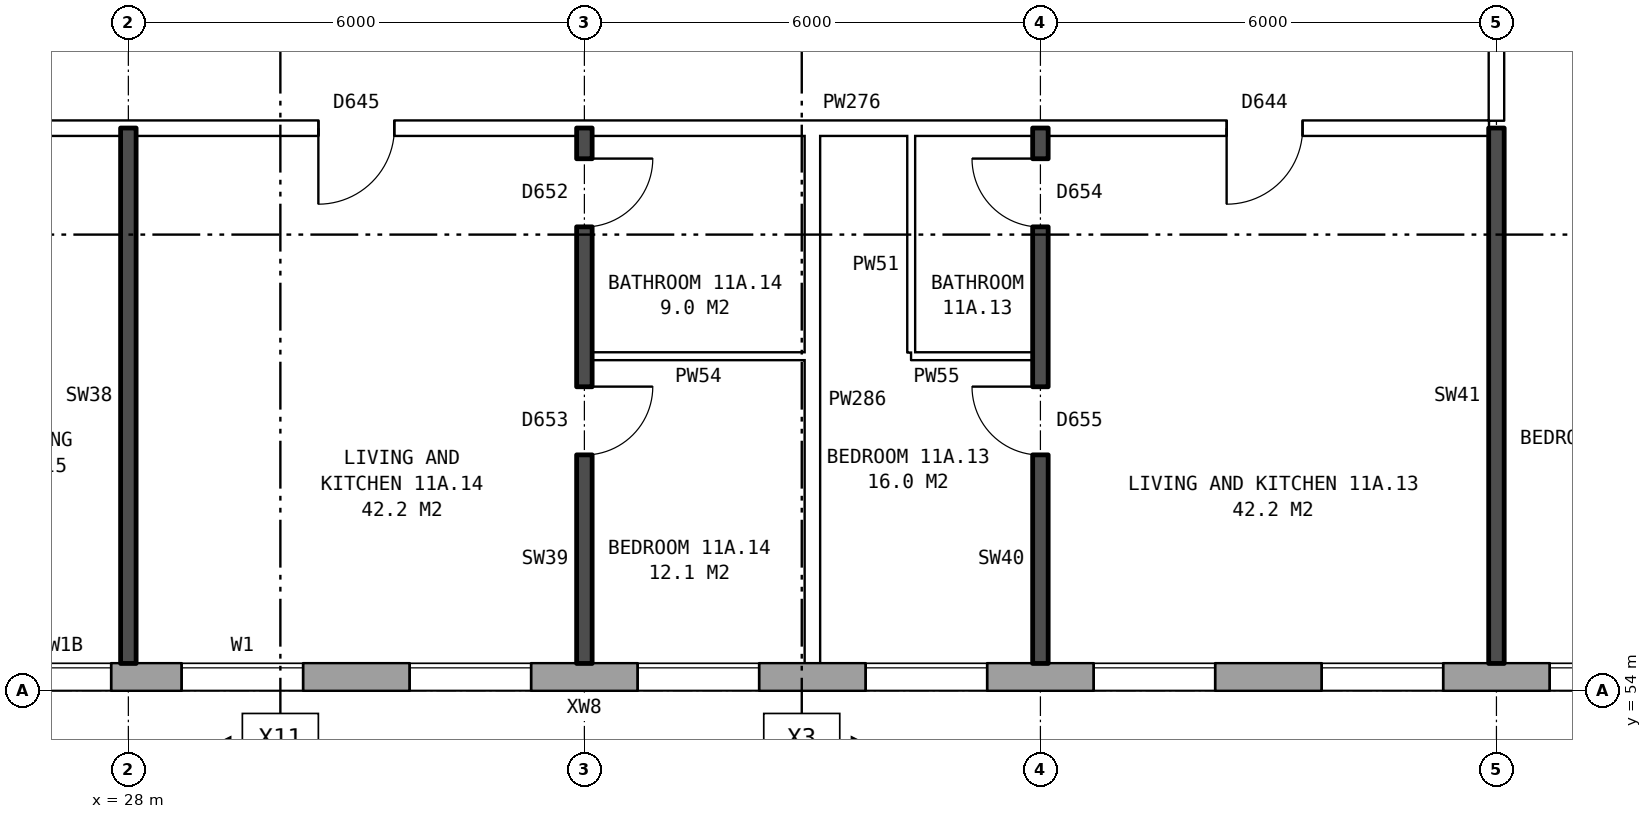
"""IFC4 building model, lengths in metres.
Left out: names, types, materials, properties, quantities, classifications, styles, units other than length and angle.
Written with IfcOpenShell. Run it as: python <this file> out.ifc"""

import sys

from ifc_helpers import new_model, si_unit, direction, frame, frame_2d, origin, place, context, subcontext, project, spatial, rectangle, extrude, element, fill, save


model = new_model("IFC4")
c1 = context("Model", 3, precision=1e-05, world=origin(), true_north=direction((0.0, 1.0)))
c2 = subcontext(c1, "Body", "Model", "MODEL_VIEW")
j1 = project(units=[si_unit("LENGTHUNIT", "METRE"), si_unit("PLANEANGLEUNIT", "RADIAN")], contexts=[c1])
p1 = place(None, origin())
s1 = spatial("IfcSite", under=j1, at=p1, CompositionType="ELEMENT")
p2 = place(p1, origin())
s2 = spatial("IfcBuilding", under=s1, at=p2, CompositionType="ELEMENT")
p3 = place(p2, frame((0.0, 0.0, 44.3)))
s3 = spatial("IfcBuildingStorey", under=s2, at=p3, CompositionType="ELEMENT", Elevation=44.3)
p4 = place(p3, frame((24.575, 54.18, 0.0), z_axis=(0.0, 0.0, 1.0), x_axis=(1.0, 0.0, 0.0)))
e1 = element("IfcWall", 1, at=p4, inside=s3, PredefinedType="STANDARD", context=c2, shape_type="SweptSolid", body=[
    extrude(rectangle(XDim=48.351, YDim=0.36, at=frame_2d((24.175, 0.0))), origin(), (0.0, 0.0, 1.0), 2.85),
])
p5 = place(p4, frame((0.65, 0.0, 0.8)))
e2 = element("IfcOpeningElement", 2, at=p5, cuts=e1, PredefinedType="OPENING", context=c2, shape_type="SweptSolid", body=[
    extrude(rectangle(XDim=1.0, YDim=0.9, at=frame_2d((0.5, 0.45))), frame((0.0, 0.19, 0.0), z_axis=(0.0, -1.0, 0.0), x_axis=(1.0, 0.0, 0.0)), (0.0, 0.0, 1.0), 0.38),
])
p6 = place(p4, frame((4.125, 0.0, 0.8)))
e3 = element("IfcOpeningElement", 3, at=p6, cuts=e1, PredefinedType="OPENING", context=c2, shape_type="SweptSolid", body=[
    extrude(rectangle(XDim=1.6, YDim=1.8, at=frame_2d((0.8, 0.9))), frame((0.0, 0.19, 0.0), z_axis=(0.0, -1.0, 0.0), x_axis=(1.0, 0.0, 0.0)), (0.0, 0.0, 1.0), 0.38),
])
p7 = place(p4, frame((7.125, 0.0, 0.8)))
e4 = element("IfcOpeningElement", 4, at=p7, cuts=e1, PredefinedType="OPENING", context=c2, shape_type="SweptSolid", body=[
    extrude(rectangle(XDim=1.6, YDim=1.8, at=frame_2d((0.8, 0.9))), frame((0.0, 0.19, 0.0), z_axis=(0.0, -1.0, 0.0), x_axis=(1.0, 0.0, 0.0)), (0.0, 0.0, 1.0), 0.38),
])
p8 = place(p4, frame((10.125, 0.0, 0.8)))
e5 = element("IfcOpeningElement", 5, at=p8, cuts=e1, PredefinedType="OPENING", context=c2, shape_type="SweptSolid", body=[
    extrude(rectangle(XDim=1.6, YDim=1.8, at=frame_2d((0.8, 0.9))), frame((0.0, 0.19, 0.0), z_axis=(0.0, -1.0, 0.0), x_axis=(1.0, 0.0, 0.0)), (0.0, 0.0, 1.0), 0.38),
])
p9 = place(p4, frame((13.125, 0.0, 0.8)))
e6 = element("IfcOpeningElement", 6, at=p9, cuts=e1, PredefinedType="OPENING", context=c2, shape_type="SweptSolid", body=[
    extrude(rectangle(XDim=1.6, YDim=1.8, at=frame_2d((0.8, 0.9))), frame((0.0, 0.19, 0.0), z_axis=(0.0, -1.0, 0.0), x_axis=(1.0, 0.0, 0.0)), (0.0, 0.0, 1.0), 0.38),
])
p10 = place(p4, frame((16.125, 0.0, 0.8)))
e7 = element("IfcOpeningElement", 7, at=p10, cuts=e1, PredefinedType="OPENING", context=c2, shape_type="SweptSolid", body=[
    extrude(rectangle(XDim=1.6, YDim=1.8, at=frame_2d((0.8, 0.9))), frame((0.0, 0.19, 0.0), z_axis=(0.0, -1.0, 0.0), x_axis=(1.0, 0.0, 0.0)), (0.0, 0.0, 1.0), 0.38),
])
p11 = place(p4, frame((19.125, 0.0, 0.8)))
e8 = element("IfcOpeningElement", 8, at=p11, cuts=e1, PredefinedType="OPENING", context=c2, shape_type="SweptSolid", body=[
    extrude(rectangle(XDim=1.6, YDim=1.8, at=frame_2d((0.8, 0.9))), frame((0.0, 0.19, 0.0), z_axis=(0.0, -1.0, 0.0), x_axis=(1.0, 0.0, 0.0)), (0.0, 0.0, 1.0), 0.38),
])
p12 = place(p4, frame((22.125, 0.0, 0.8)))
e9 = element("IfcOpeningElement", 9, at=p12, cuts=e1, PredefinedType="OPENING", context=c2, shape_type="SweptSolid", body=[
    extrude(rectangle(XDim=1.6, YDim=1.8, at=frame_2d((0.8, 0.9))), frame((0.0, 0.19, 0.0), z_axis=(0.0, -1.0, 0.0), x_axis=(1.0, 0.0, 0.0)), (0.0, 0.0, 1.0), 0.38),
])
p13 = place(p4, frame((25.125, 0.0, 0.8)))
e10 = element("IfcOpeningElement", 10, at=p13, cuts=e1, PredefinedType="OPENING", context=c2, shape_type="SweptSolid", body=[
    extrude(rectangle(XDim=1.6, YDim=1.8, at=frame_2d((0.8, 0.9))), frame((0.0, 0.19, 0.0), z_axis=(0.0, -1.0, 0.0), x_axis=(1.0, 0.0, 0.0)), (0.0, 0.0, 1.0), 0.38),
])
p14 = place(p4, frame((28.125, 0.0, 0.8)))
e11 = element("IfcOpeningElement", 11, at=p14, cuts=e1, PredefinedType="OPENING", context=c2, shape_type="SweptSolid", body=[
    extrude(rectangle(XDim=1.6, YDim=1.8, at=frame_2d((0.8, 0.9))), frame((0.0, 0.19, 0.0), z_axis=(0.0, -1.0, 0.0), x_axis=(1.0, 0.0, 0.0)), (0.0, 0.0, 1.0), 0.38),
])
p15 = place(p4, frame((31.125, 0.0, 0.8)))
e12 = element("IfcOpeningElement", 12, at=p15, cuts=e1, PredefinedType="OPENING", context=c2, shape_type="SweptSolid", body=[
    extrude(rectangle(XDim=1.6, YDim=1.8, at=frame_2d((0.8, 0.9))), frame((0.0, 0.19, 0.0), z_axis=(0.0, -1.0, 0.0), x_axis=(1.0, 0.0, 0.0)), (0.0, 0.0, 1.0), 0.38),
])
p16 = place(p4, frame((34.125, 0.0, 0.8)))
e13 = element("IfcOpeningElement", 13, at=p16, cuts=e1, PredefinedType="OPENING", context=c2, shape_type="SweptSolid", body=[
    extrude(rectangle(XDim=1.6, YDim=1.8, at=frame_2d((0.8, 0.9))), frame((0.0, 0.19, 0.0), z_axis=(0.0, -1.0, 0.0), x_axis=(1.0, 0.0, 0.0)), (0.0, 0.0, 1.0), 0.38),
])
p17 = place(p4, frame((37.125, 0.0, 0.8)))
e14 = element("IfcOpeningElement", 14, at=p17, cuts=e1, PredefinedType="OPENING", context=c2, shape_type="SweptSolid", body=[
    extrude(rectangle(XDim=1.6, YDim=1.8, at=frame_2d((0.8, 0.9))), frame((0.0, 0.19, 0.0), z_axis=(0.0, -1.0, 0.0), x_axis=(1.0, 0.0, 0.0)), (0.0, 0.0, 1.0), 0.38),
])
p18 = place(p4, frame((40.125, 0.0, 0.8)))
e15 = element("IfcOpeningElement", 15, at=p18, cuts=e1, PredefinedType="OPENING", context=c2, shape_type="SweptSolid", body=[
    extrude(rectangle(XDim=1.6, YDim=1.8, at=frame_2d((0.8, 0.9))), frame((0.0, 0.19, 0.0), z_axis=(0.0, -1.0, 0.0), x_axis=(1.0, 0.0, 0.0)), (0.0, 0.0, 1.0), 0.38),
])
p19 = place(p4, frame((43.125, 0.0, 0.8)))
e16 = element("IfcOpeningElement", 16, at=p19, cuts=e1, PredefinedType="OPENING", context=c2, shape_type="SweptSolid", body=[
    extrude(rectangle(XDim=1.6, YDim=1.8, at=frame_2d((0.8, 0.9))), frame((0.0, 0.19, 0.0), z_axis=(0.0, -1.0, 0.0), x_axis=(1.0, 0.0, 0.0)), (0.0, 0.0, 1.0), 0.38),
])
p20 = place(p4, frame((45.625, 0.0, 0.8)))
e17 = element("IfcOpeningElement", 17, at=p20, cuts=e1, PredefinedType="OPENING", context=c2, shape_type="SweptSolid", body=[
    extrude(rectangle(XDim=1.0, YDim=1.5, at=frame_2d((0.5, 0.75))), frame((0.0, 0.19, 0.0), z_axis=(0.0, -1.0, 0.0), x_axis=(1.0, 0.0, 0.0)), (0.0, 0.0, 1.0), 0.38),
])
p21 = place(p4, frame((2.0, 0.0, 0.8)))
e18 = element("IfcOpeningElement", 18, at=p21, cuts=e1, PredefinedType="OPENING", context=c2, shape_type="SweptSolid", body=[
    extrude(rectangle(XDim=1.2, YDim=1.8, at=frame_2d((0.6, 0.9))), frame((0.0, 0.19, 0.0), z_axis=(0.0, -1.0, 0.0), x_axis=(1.0, 0.0, 0.0)), (0.0, 0.0, 1.0), 0.38),
])
p22 = place(p4, frame((46.925, 0.0, 0.8)))
e19 = element("IfcOpeningElement", 19, at=p22, cuts=e1, PredefinedType="OPENING", context=c2, shape_type="SweptSolid", body=[
    extrude(rectangle(XDim=0.6, YDim=0.9, at=frame_2d((0.3, 0.45))), frame((0.0, 0.19, 0.0), z_axis=(0.0, -1.0, 0.0), x_axis=(1.0, 0.0, 0.0)), (0.0, 0.0, 1.0), 0.38),
])
p23 = place(p3, frame((34.1, 58.4, 0.0), z_axis=(0.0, 0.0, 1.0), x_axis=(1.0, 0.0, 0.0)))
e20 = element("IfcWall", 20, at=p23, inside=s3, PredefinedType="PARTITIONING", context=c2, shape_type="SweptSolid", body=[
    extrude(rectangle(XDim=2.8, YDim=0.1, at=frame_2d((1.4, 0.0))), origin(), (0.0, 0.0, 1.0), 2.85),
])
p24 = place(p3, frame((38.3, 58.4, 0.0), z_axis=(0.0, 0.0, 1.0), x_axis=(1.0, 0.0, 0.0)))
e21 = element("IfcWall", 21, at=p24, inside=s3, PredefinedType="PARTITIONING", context=c2, shape_type="SweptSolid", body=[
    extrude(rectangle(XDim=1.6, YDim=0.1, at=frame_2d((0.8, 0.0))), origin(), (0.0, 0.0, 1.0), 2.85),
])
p25 = place(p3, frame((21.86, 61.4, 0.0), z_axis=(0.0, 0.0, 1.0), x_axis=(1.0, 0.0, 0.0)))
e22 = element("IfcWall", 22, at=p25, inside=s3, PredefinedType="PARTITIONING", context=c2, shape_type="SweptSolid", body=[
    extrude(rectangle(XDim=24.04, YDim=0.2, at=frame_2d((12.02, 0.0))), origin(), (0.0, 0.0, 1.0), 2.85),
])
p26 = place(p25, frame((20.59, 0.0, 0.0)))
e23 = element("IfcOpeningElement", 23, at=p26, cuts=e22, PredefinedType="OPENING", context=c2, shape_type="SweptSolid", body=[
    extrude(rectangle(XDim=1.0, YDim=2.1, at=frame_2d((0.5, 1.05))), frame((0.0, 0.11, 0.0), z_axis=(0.0, -1.0, 0.0), x_axis=(1.0, 0.0, 0.0)), (0.0, 0.0, 1.0), 0.22),
])
p27 = place(p25, frame((8.64, 0.0, 0.0)))
e24 = element("IfcOpeningElement", 24, at=p27, cuts=e22, PredefinedType="OPENING", context=c2, shape_type="SweptSolid", body=[
    extrude(rectangle(XDim=1.0, YDim=2.1, at=frame_2d((0.5, 1.05))), frame((0.0, 0.11, 0.0), z_axis=(0.0, -1.0, 0.0), x_axis=(1.0, 0.0, 0.0)), (0.0, 0.0, 1.0), 0.22),
])
p28 = place(p25, frame((3.64, 0.0, 0.0)))
e25 = element("IfcOpeningElement", 25, at=p28, cuts=e22, PredefinedType="OPENING", context=c2, shape_type="SweptSolid", body=[
    extrude(rectangle(XDim=1.0, YDim=2.1, at=frame_2d((0.5, 1.05))), frame((0.0, 0.11, 0.0), z_axis=(0.0, -1.0, 0.0), x_axis=(1.0, 0.0, 0.0)), (0.0, 0.0, 1.0), 0.22),
])
p29 = place(p3, frame((28.0, 54.36, 0.0), z_axis=(0.0, 0.0, 1.0), x_axis=(0.0, 1.0, 0.0)))
e26 = element("IfcWall", 26, at=p29, inside=s3, PredefinedType="SOLIDWALL", context=c2, shape_type="SweptSolid", body=[
    extrude(rectangle(XDim=7.04, YDim=0.2, at=frame_2d((3.52, 0.0))), origin(), (0.0, 0.0, 1.0), 2.85),
])
p30 = place(p3, frame((34.0, 54.36, 0.0), z_axis=(0.0, 0.0, 1.0), x_axis=(0.0, 1.0, 0.0)))
e27 = element("IfcWall", 27, at=p30, inside=s3, PredefinedType="SOLIDWALL", context=c2, shape_type="SweptSolid", body=[
    extrude(rectangle(XDim=7.04, YDim=0.2, at=frame_2d((3.52, 0.0))), origin(), (0.0, 0.0, 1.0), 2.85),
])
p31 = place(p30, frame((2.74, 0.0, 0.0)))
e28 = element("IfcOpeningElement", 28, at=p31, cuts=e27, PredefinedType="OPENING", context=c2, shape_type="SweptSolid", body=[
    extrude(rectangle(XDim=0.9, YDim=2.1, at=frame_2d((0.45, 1.05))), frame((0.0, 0.11, 0.0), z_axis=(0.0, -1.0, 0.0), x_axis=(1.0, 0.0, 0.0)), (0.0, 0.0, 1.0), 0.22),
])
p32 = place(p30, frame((5.74, 0.0, 0.0)))
e29 = element("IfcOpeningElement", 29, at=p32, cuts=e27, PredefinedType="OPENING", context=c2, shape_type="SweptSolid", body=[
    extrude(rectangle(XDim=0.9, YDim=2.1, at=frame_2d((0.45, 1.05))), frame((0.0, 0.11, 0.0), z_axis=(0.0, -1.0, 0.0), x_axis=(1.0, 0.0, 0.0)), (0.0, 0.0, 1.0), 0.22),
])
p33 = place(p3, frame((37.0, 54.36, 0.0), z_axis=(0.0, 0.0, 1.0), x_axis=(0.0, 1.0, 0.0)))
e30 = element("IfcWall", 30, at=p33, inside=s3, PredefinedType="PARTITIONING", context=c2, shape_type="SweptSolid", body=[
    extrude(rectangle(XDim=6.94, YDim=0.2, at=frame_2d((3.47, 0.0))), origin(), (0.0, 0.0, 1.0), 2.85),
])
p34 = place(p3, frame((38.3, 58.45, 0.0), z_axis=(0.0, 0.0, 1.0), x_axis=(0.0, 1.0, 0.0)))
e31 = element("IfcWall", 31, at=p34, inside=s3, PredefinedType="PARTITIONING", context=c2, shape_type="SweptSolid", body=[
    extrude(rectangle(XDim=2.85, YDim=0.1, at=frame_2d((1.425, 0.0))), origin(), (0.0, 0.0, 1.0), 2.85),
])
p35 = place(p3, frame((40.0, 54.36, 0.0), z_axis=(0.0, 0.0, 1.0), x_axis=(0.0, 1.0, 0.0)))
e32 = element("IfcWall", 32, at=p35, inside=s3, PredefinedType="SOLIDWALL", context=c2, shape_type="SweptSolid", body=[
    extrude(rectangle(XDim=7.04, YDim=0.2, at=frame_2d((3.52, 0.0))), origin(), (0.0, 0.0, 1.0), 2.85),
])
p36 = place(p35, frame((2.74, 0.0, 0.0)))
e33 = element("IfcOpeningElement", 33, at=p36, cuts=e32, PredefinedType="OPENING", context=c2, shape_type="SweptSolid", body=[
    extrude(rectangle(XDim=0.9, YDim=2.1, at=frame_2d((0.45, 1.05))), frame((0.0, 0.11, 0.0), z_axis=(0.0, -1.0, 0.0), x_axis=(1.0, 0.0, 0.0)), (0.0, 0.0, 1.0), 0.22),
])
p37 = place(p35, frame((5.74, 0.0, 0.0)))
e34 = element("IfcOpeningElement", 34, at=p37, cuts=e32, PredefinedType="OPENING", context=c2, shape_type="SweptSolid", body=[
    extrude(rectangle(XDim=0.9, YDim=2.1, at=frame_2d((0.45, 1.05))), frame((0.0, 0.11, 0.0), z_axis=(0.0, -1.0, 0.0), x_axis=(1.0, 0.0, 0.0)), (0.0, 0.0, 1.0), 0.22),
])
p38 = place(p3, frame((46.0, 54.36, 0.0), z_axis=(0.0, 0.0, 1.0), x_axis=(0.0, 1.0, 0.0)))
e35 = element("IfcWall", 35, at=p38, inside=s3, PredefinedType="SOLIDWALL", context=c2, shape_type="SweptSolid", body=[
    extrude(rectangle(XDim=7.04, YDim=0.2, at=frame_2d((3.52, 0.0))), origin(), (0.0, 0.0, 1.0), 2.85),
])
p39 = place(p3, frame((46.0, 61.5, 0.0), z_axis=(0.0, 0.0, 1.0), x_axis=(0.0, 1.0, 0.0)))
e36 = element("IfcWall", 36, at=p39, inside=s3, PredefinedType="PARTITIONING", context=c2, shape_type="SweptSolid", body=[
    extrude(rectangle(XDim=2.2, YDim=0.2, at=frame_2d((1.1, 0.0))), origin(), (0.0, 0.0, 1.0), 2.85),
])
p40 = place(p6, origin())
e37 = element("IfcWindow", 37, at=p40, inside=s3, PartitioningType="SINGLE_PANEL", PredefinedType="WINDOW", context=c2, shape_type="SweptSolid", body=[
    extrude(rectangle(XDim=1.6, YDim=1.8, at=frame_2d((0.8, 0.9))), frame((0.0, 0.15, 0.0), z_axis=(0.0, -1.0, 0.0), x_axis=(1.0, 0.0, 0.0)), (0.0, 0.0, 1.0), 0.06),
])
fill(e3, e37)
p41 = place(p7, origin())
e38 = element("IfcWindow", 38, at=p41, inside=s3, PartitioningType="SINGLE_PANEL", PredefinedType="WINDOW", context=c2, shape_type="SweptSolid", body=[
    extrude(rectangle(XDim=1.6, YDim=1.8, at=frame_2d((0.8, 0.9))), frame((0.0, 0.15, 0.0), z_axis=(0.0, -1.0, 0.0), x_axis=(1.0, 0.0, 0.0)), (0.0, 0.0, 1.0), 0.06),
])
fill(e4, e38)
p42 = place(p8, origin())
e39 = element("IfcWindow", 39, at=p42, inside=s3, PartitioningType="SINGLE_PANEL", PredefinedType="WINDOW", context=c2, shape_type="SweptSolid", body=[
    extrude(rectangle(XDim=1.6, YDim=1.8, at=frame_2d((0.8, 0.9))), frame((0.0, 0.15, 0.0), z_axis=(0.0, -1.0, 0.0), x_axis=(1.0, 0.0, 0.0)), (0.0, 0.0, 1.0), 0.06),
])
fill(e5, e39)
p43 = place(p9, origin())
e40 = element("IfcWindow", 40, at=p43, inside=s3, PartitioningType="SINGLE_PANEL", PredefinedType="WINDOW", context=c2, shape_type="SweptSolid", body=[
    extrude(rectangle(XDim=1.6, YDim=1.8, at=frame_2d((0.8, 0.9))), frame((0.0, 0.15, 0.0), z_axis=(0.0, -1.0, 0.0), x_axis=(1.0, 0.0, 0.0)), (0.0, 0.0, 1.0), 0.06),
])
fill(e6, e40)
p44 = place(p10, origin())
e41 = element("IfcWindow", 41, at=p44, inside=s3, PartitioningType="SINGLE_PANEL", PredefinedType="WINDOW", context=c2, shape_type="SweptSolid", body=[
    extrude(rectangle(XDim=1.6, YDim=1.8, at=frame_2d((0.8, 0.9))), frame((0.0, 0.15, 0.0), z_axis=(0.0, -1.0, 0.0), x_axis=(1.0, 0.0, 0.0)), (0.0, 0.0, 1.0), 0.06),
])
fill(e7, e41)
p45 = place(p11, origin())
e42 = element("IfcWindow", 42, at=p45, inside=s3, PartitioningType="SINGLE_PANEL", PredefinedType="WINDOW", context=c2, shape_type="SweptSolid", body=[
    extrude(rectangle(XDim=1.6, YDim=1.8, at=frame_2d((0.8, 0.9))), frame((0.0, 0.15, 0.0), z_axis=(0.0, -1.0, 0.0), x_axis=(1.0, 0.0, 0.0)), (0.0, 0.0, 1.0), 0.06),
])
fill(e8, e42)
p46 = place(p12, origin())
e43 = element("IfcWindow", 43, at=p46, inside=s3, PartitioningType="SINGLE_PANEL", PredefinedType="WINDOW", context=c2, shape_type="SweptSolid", body=[
    extrude(rectangle(XDim=1.6, YDim=1.8, at=frame_2d((0.8, 0.9))), frame((0.0, 0.15, 0.0), z_axis=(0.0, -1.0, 0.0), x_axis=(1.0, 0.0, 0.0)), (0.0, 0.0, 1.0), 0.06),
])
fill(e9, e43)
p47 = place(p36, origin())
e44 = element("IfcDoor", 44, at=p47, inside=s3, OperationType="SINGLE_SWING_RIGHT", PredefinedType="DOOR", context=c2, shape_type="SweptSolid", body=[
    extrude(rectangle(XDim=0.9, YDim=2.1, at=frame_2d((0.45, 1.05))), frame((0.0, 0.025, 0.0), z_axis=(0.0, -1.0, 0.0), x_axis=(1.0, 0.0, 0.0)), (0.0, 0.0, 1.0), 0.05),
])
fill(e33, e44)
p48 = place(p26, frame((1.0, 0.0, 0.0), z_axis=(0.0, 0.0, 1.0), x_axis=(-1.0, 0.0, 0.0)))
e45 = element("IfcDoor", 45, at=p48, inside=s3, OperationType="SINGLE_SWING_RIGHT", PredefinedType="DOOR", context=c2, shape_type="SweptSolid", body=[
    extrude(rectangle(XDim=1.0, YDim=2.1, at=frame_2d((0.5, 1.05))), frame((0.0, 0.025, 0.0), z_axis=(0.0, -1.0, 0.0), x_axis=(1.0, 0.0, 0.0)), (0.0, 0.0, 1.0), 0.05),
])
fill(e23, e45)
p49 = place(p37, origin())
e46 = element("IfcDoor", 46, at=p49, inside=s3, OperationType="SINGLE_SWING_RIGHT", PredefinedType="DOOR", context=c2, shape_type="SweptSolid", body=[
    extrude(rectangle(XDim=0.9, YDim=2.1, at=frame_2d((0.45, 1.05))), frame((0.0, 0.025, 0.0), z_axis=(0.0, -1.0, 0.0), x_axis=(1.0, 0.0, 0.0)), (0.0, 0.0, 1.0), 0.05),
])
fill(e34, e46)
p50 = place(p31, frame((0.9, 0.0, 0.0), z_axis=(0.0, 0.0, 1.0), x_axis=(-1.0, 0.0, 0.0)))
e47 = element("IfcDoor", 47, at=p50, inside=s3, OperationType="SINGLE_SWING_LEFT", PredefinedType="DOOR", context=c2, shape_type="SweptSolid", body=[
    extrude(rectangle(XDim=0.9, YDim=2.1, at=frame_2d((0.45, 1.05))), frame((0.0, 0.025, 0.0), z_axis=(0.0, -1.0, 0.0), x_axis=(1.0, 0.0, 0.0)), (0.0, 0.0, 1.0), 0.05),
])
fill(e28, e47)
p51 = place(p27, frame((1.0, 0.0, 0.0), z_axis=(0.0, 0.0, 1.0), x_axis=(-1.0, 0.0, 0.0)))
e48 = element("IfcDoor", 48, at=p51, inside=s3, OperationType="SINGLE_SWING_RIGHT", PredefinedType="DOOR", context=c2, shape_type="SweptSolid", body=[
    extrude(rectangle(XDim=1.0, YDim=2.1, at=frame_2d((0.5, 1.05))), frame((0.0, 0.025, 0.0), z_axis=(0.0, -1.0, 0.0), x_axis=(1.0, 0.0, 0.0)), (0.0, 0.0, 1.0), 0.05),
])
fill(e24, e48)
p52 = place(p32, frame((0.9, 0.0, 0.0), z_axis=(0.0, 0.0, 1.0), x_axis=(-1.0, 0.0, 0.0)))
e49 = element("IfcDoor", 49, at=p52, inside=s3, OperationType="SINGLE_SWING_LEFT", PredefinedType="DOOR", context=c2, shape_type="SweptSolid", body=[
    extrude(rectangle(XDim=0.9, YDim=2.1, at=frame_2d((0.45, 1.05))), frame((0.0, 0.025, 0.0), z_axis=(0.0, -1.0, 0.0), x_axis=(1.0, 0.0, 0.0)), (0.0, 0.0, 1.0), 0.05),
])
fill(e29, e49)
p53 = place(p21, origin())
e50 = element("IfcWindow", 50, at=p53, inside=s3, PartitioningType="SINGLE_PANEL", PredefinedType="WINDOW", context=c2, shape_type="SweptSolid", body=[
    extrude(rectangle(XDim=1.2, YDim=1.8, at=frame_2d((0.6, 0.9))), frame((0.0, 0.15, 0.0), z_axis=(0.0, -1.0, 0.0), x_axis=(1.0, 0.0, 0.0)), (0.0, 0.0, 1.0), 0.06),
])
fill(e18, e50)
save(model, sys.argv[1])
